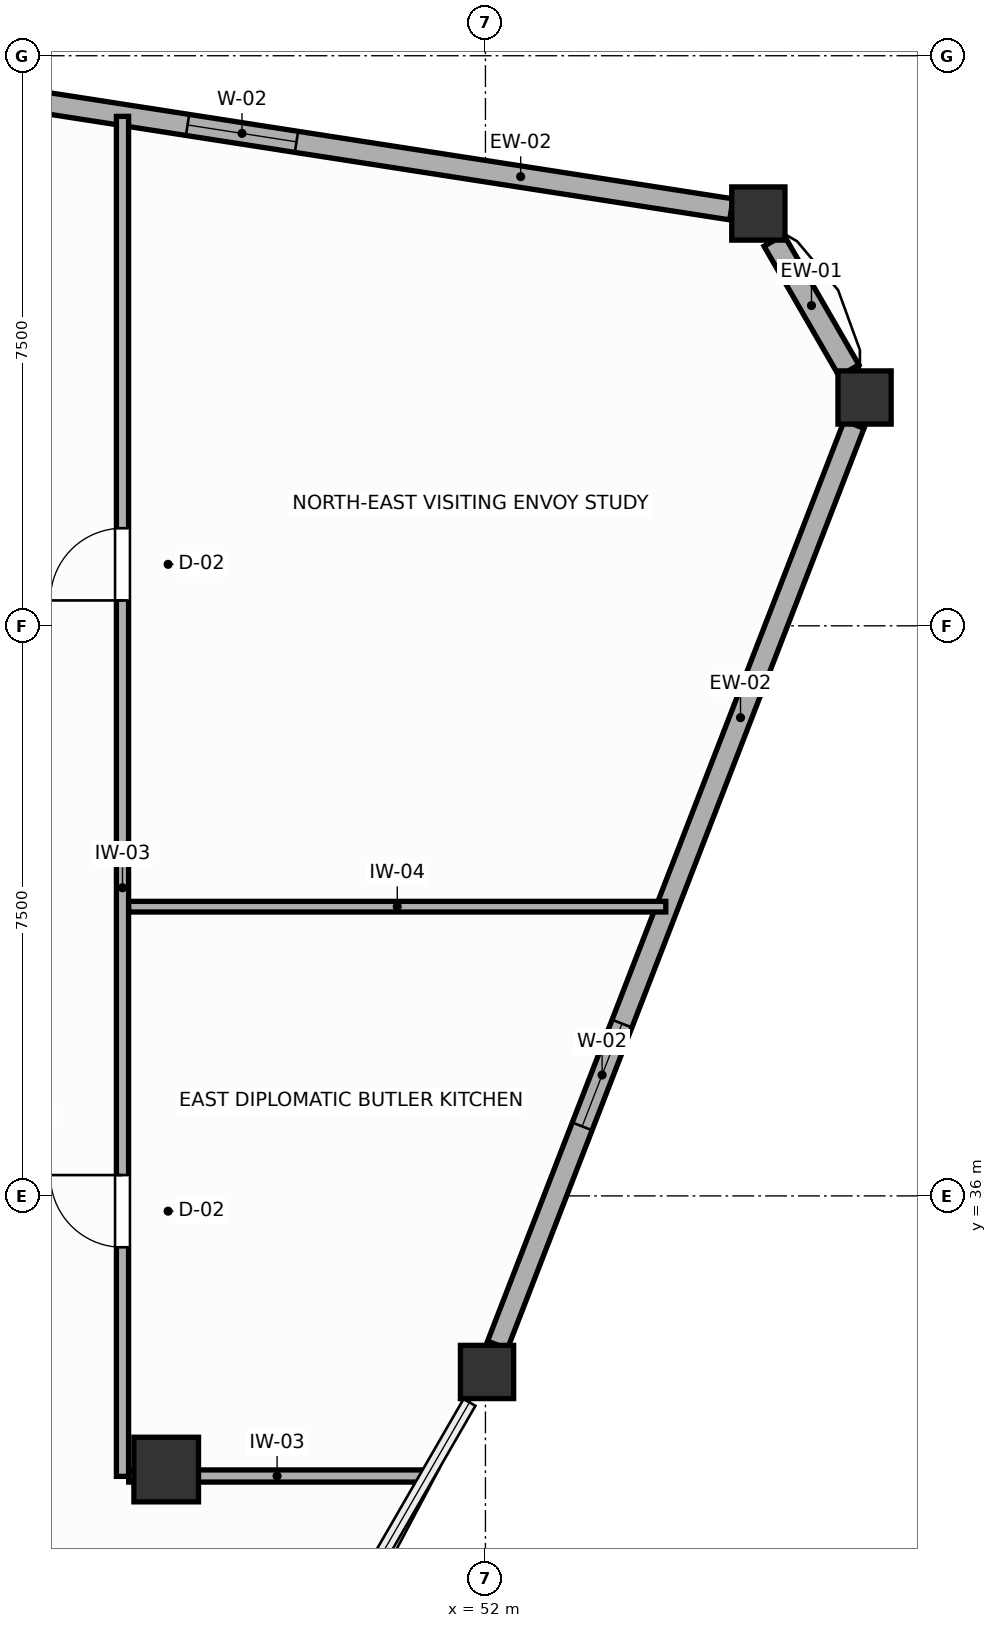
"""IFC4 building model, lengths in metres.
Left out: names, types, materials, properties, quantities, classifications, styles, units other than length and angle.
Written with IfcOpenShell. Run it as: python <this file> out.ifc"""

import sys

from ifc_helpers import new_model, si_unit, direction, frame, frame_2d, origin, origin_2d, place, context, subcontext, project, spatial, rectangle, extrude, source, transform, mapped, element, fill, save


model = new_model("IFC4")
c1 = context("Model", 3, precision=1e-05, world=origin(), true_north=direction((0.0, 1.0)))
c2 = subcontext(c1, "Body", "Model", "MODEL_VIEW")
j1 = project(units=[si_unit("LENGTHUNIT", "METRE"), si_unit("PLANEANGLEUNIT", "RADIAN")], contexts=[c1])
p1 = place(None, origin())
s1 = spatial("IfcSite", under=j1, at=p1, CompositionType="ELEMENT")
p2 = place(p1, origin())
s2 = spatial("IfcBuilding", under=s1, at=p2, CompositionType="ELEMENT")
p3 = place(p2, frame((0.0, 0.0, 246.6)))
s3 = spatial("IfcBuildingStorey", under=s2, at=p3, CompositionType="ELEMENT", Elevation=246.6)
m1 = source(origin(), c2, "Body", "SweptSolid", [
    extrude(rectangle(XDim=0.85, YDim=0.85, at=origin_2d()), origin(), (0.0, 0.0, 1.0), 3.6),
])
p4 = place(p3, frame((47.8, 32.4, 0.0), z_axis=(0.0, 0.0, 1.0), x_axis=(1.0, 0.0, 0.0)))
e1 = element("IfcColumn", 1, at=p4, inside=s3, PredefinedType="COLUMN", context=c2, shape_type="MappedRepresentation", body=[
    mapped(m1, transform((0.0, 0.0, 0.0), scale=1.0)),
])
m2 = source(origin(), c2, "Body", "SweptSolid", [
    extrude(rectangle(XDim=0.7, YDim=0.7, at=origin_2d()), origin(), (0.0, 0.0, 1.0), 3.6),
])
for number, where, z_axis, x_axis in (
    (2, (56.988, 46.504, 0.0), (0.0, 0.0, 1.0), (1.0, 0.0, 0.0)),
    (3, (55.59, 48.924, 0.0), (0.0, 0.0, 1.0), (1.0, 0.0, 0.0)),
    (4, (52.021, 33.684, 0.0), (0.0, 0.0, 1.0), (1.0, 0.0, 0.0)),
):
    element("IfcColumn", number, at=place(p3, frame(where, z_axis=z_axis, x_axis=x_axis)), inside=s3, PredefinedType="COLUMN", context=c2, shape_type="MappedRepresentation", body=[
        mapped(m2, transform((0.0, 0.0, 0.0), scale=1.0)),
    ])
p5 = place(p3, frame((56.783, 46.859, 0.0), z_axis=(0.0, 0.0, 1.0), x_axis=(-0.499915072674, 0.866074431047, 0.0)))
e5 = element("IfcWall", 5, at=p5, inside=s3, PredefinedType="SOLIDWALL", context=c2, shape_type="SweptSolid", body=[
    extrude(rectangle(XDim=1.975, YDim=0.3, at=frame_2d((0.987, 0.0))), origin(), (0.0, 0.0, 1.0), 3.08),
])
p6 = place(p3, frame((55.235, 48.979, 0.0), z_axis=(0.0, 0.0, 1.0), x_axis=(-0.988170476673, 0.153359411293, 0.0)))
e6 = element("IfcWall", 6, at=p6, inside=s3, PredefinedType="SOLIDWALL", context=c2, shape_type="SweptSolid", body=[
    extrude(rectangle(XDim=13.03, YDim=0.28, at=frame_2d((6.515, 0.0))), origin(), (0.0, 0.0, 1.0), 3.08),
])
p7 = place(p6, frame((5.79, 0.0, 0.75)))
e7 = element("IfcOpeningElement", 7, at=p7, cuts=e6, PredefinedType="OPENING", context=c2, shape_type="SweptSolid", body=[
    extrude(rectangle(XDim=1.45, YDim=1.65, at=frame_2d((0.725, 0.825))), frame((0.0, 0.15, 0.0), z_axis=(0.0, -1.0, 0.0), x_axis=(1.0, 0.0, 0.0)), (0.0, 0.0, 1.0), 0.3),
])
p8 = place(p3, frame((52.158, 34.039, 0.0), z_axis=(0.0, 0.0, 1.0), x_axis=(0.361269378379, 0.93246149317, 0.0)))
e8 = element("IfcWall", 8, at=p8, inside=s3, PredefinedType="SOLIDWALL", context=c2, shape_type="SweptSolid", body=[
    extrude(rectangle(XDim=12.987, YDim=0.28, at=frame_2d((6.494, 0.0))), origin(), (0.0, 0.0, 1.0), 3.08),
])
p9 = place(p8, frame((3.084, 0.0, 0.75)))
e9 = element("IfcOpeningElement", 9, at=p9, cuts=e8, PredefinedType="OPENING", context=c2, shape_type="SweptSolid", body=[
    extrude(rectangle(XDim=1.45, YDim=1.65, at=frame_2d((0.725, 0.825))), frame((0.0, 0.15, 0.0), z_axis=(0.0, -1.0, 0.0), x_axis=(1.0, 0.0, 0.0)), (0.0, 0.0, 1.0), 0.3),
])
p10 = place(p3, frame((47.225, 32.31, 0.0), z_axis=(0.0, 0.0, 1.0), x_axis=(0.0, 1.0, 0.0)))
e10 = element("IfcWall", 10, at=p10, inside=s3, PredefinedType="PARTITIONING", context=c2, shape_type="SweptSolid", body=[
    extrude(rectangle(XDim=17.892, YDim=0.16, at=frame_2d((8.946, 0.0))), origin(), (0.0, 0.0, 1.0), 3.41),
])
p11 = place(p10, frame((3.014, 0.0, 0.0)))
e11 = element("IfcOpeningElement", 11, at=p11, cuts=e10, PredefinedType="OPENING", context=c2, shape_type="SweptSolid", body=[
    extrude(rectangle(XDim=0.95, YDim=2.05, at=frame_2d((0.475, 1.025))), frame((0.0, 0.09, 0.0), z_axis=(0.0, -1.0, 0.0), x_axis=(1.0, 0.0, 0.0)), (0.0, 0.0, 1.0), 0.18),
])
p12 = place(p10, frame((11.524, 0.0, 0.0)))
e12 = element("IfcOpeningElement", 12, at=p12, cuts=e10, PredefinedType="OPENING", context=c2, shape_type="SweptSolid", body=[
    extrude(rectangle(XDim=0.95, YDim=2.05, at=frame_2d((0.475, 1.025))), frame((0.0, 0.09, 0.0), z_axis=(0.0, -1.0, 0.0), x_axis=(1.0, 0.0, 0.0)), (0.0, 0.0, 1.0), 0.18),
])
p13 = place(p3, frame((47.307, 32.315, 0.0), z_axis=(0.0, 0.0, 1.0), x_axis=(1.0, 0.0, 0.0)))
e13 = element("IfcWall", 13, at=p13, inside=s3, PredefinedType="PARTITIONING", context=c2, shape_type="SweptSolid", body=[
    extrude(rectangle(XDim=3.904, YDim=0.16, at=frame_2d((1.952, 0.0))), origin(), (0.0, 0.0, 1.0), 3.08),
])
p14 = place(p3, frame((47.307, 39.805, 0.0), z_axis=(0.0, 0.0, 1.0), x_axis=(1.0, 0.0, 0.0)))
e14 = element("IfcWall", 14, at=p14, inside=s3, PredefinedType="PARTITIONING", context=c2, shape_type="SweptSolid", body=[
    extrude(rectangle(XDim=7.066, YDim=0.14, at=frame_2d((3.533, 0.0))), origin(), (0.0, 0.0, 1.0), 3.41),
])
p15 = place(p7, origin())
e15 = element("IfcWindow", 15, at=p15, inside=s3, PartitioningType="SINGLE_PANEL", PredefinedType="WINDOW", context=c2, shape_type="SweptSolid", body=[
    extrude(rectangle(XDim=1.45, YDim=1.65, at=frame_2d((0.725, 0.825))), frame((0.0, 0.03, 0.0), z_axis=(0.0, -1.0, 0.0), x_axis=(1.0, 0.0, 0.0)), (0.0, 0.0, 1.0), 0.06),
])
fill(e7, e15)
p16 = place(p9, origin())
e16 = element("IfcWindow", 16, at=p16, inside=s3, PartitioningType="SINGLE_PANEL", PredefinedType="WINDOW", context=c2, shape_type="SweptSolid", body=[
    extrude(rectangle(XDim=1.45, YDim=1.65, at=frame_2d((0.725, 0.825))), frame((0.0, 0.03, 0.0), z_axis=(0.0, -1.0, 0.0), x_axis=(1.0, 0.0, 0.0)), (0.0, 0.0, 1.0), 0.06),
])
fill(e9, e16)
p17 = place(p11, origin())
e17 = element("IfcDoor", 17, at=p17, inside=s3, OperationType="SINGLE_SWING_RIGHT", PredefinedType="DOOR", context=c2, shape_type="SweptSolid", body=[
    extrude(rectangle(XDim=0.95, YDim=2.05, at=frame_2d((0.475, 1.025))), frame((0.0, 0.025, 0.0), z_axis=(0.0, -1.0, 0.0), x_axis=(1.0, 0.0, 0.0)), (0.0, 0.0, 1.0), 0.05),
])
fill(e11, e17)
p18 = place(p12, origin())
e18 = element("IfcDoor", 18, at=p18, inside=s3, OperationType="SINGLE_SWING_LEFT", PredefinedType="DOOR", context=c2, shape_type="SweptSolid", body=[
    extrude(rectangle(XDim=0.95, YDim=2.05, at=frame_2d((0.475, 1.025))), frame((0.0, 0.025, 0.0), z_axis=(0.0, -1.0, 0.0), x_axis=(1.0, 0.0, 0.0)), (0.0, 0.0, 1.0), 0.05),
])
fill(e12, e18)
save(model, sys.argv[1])
